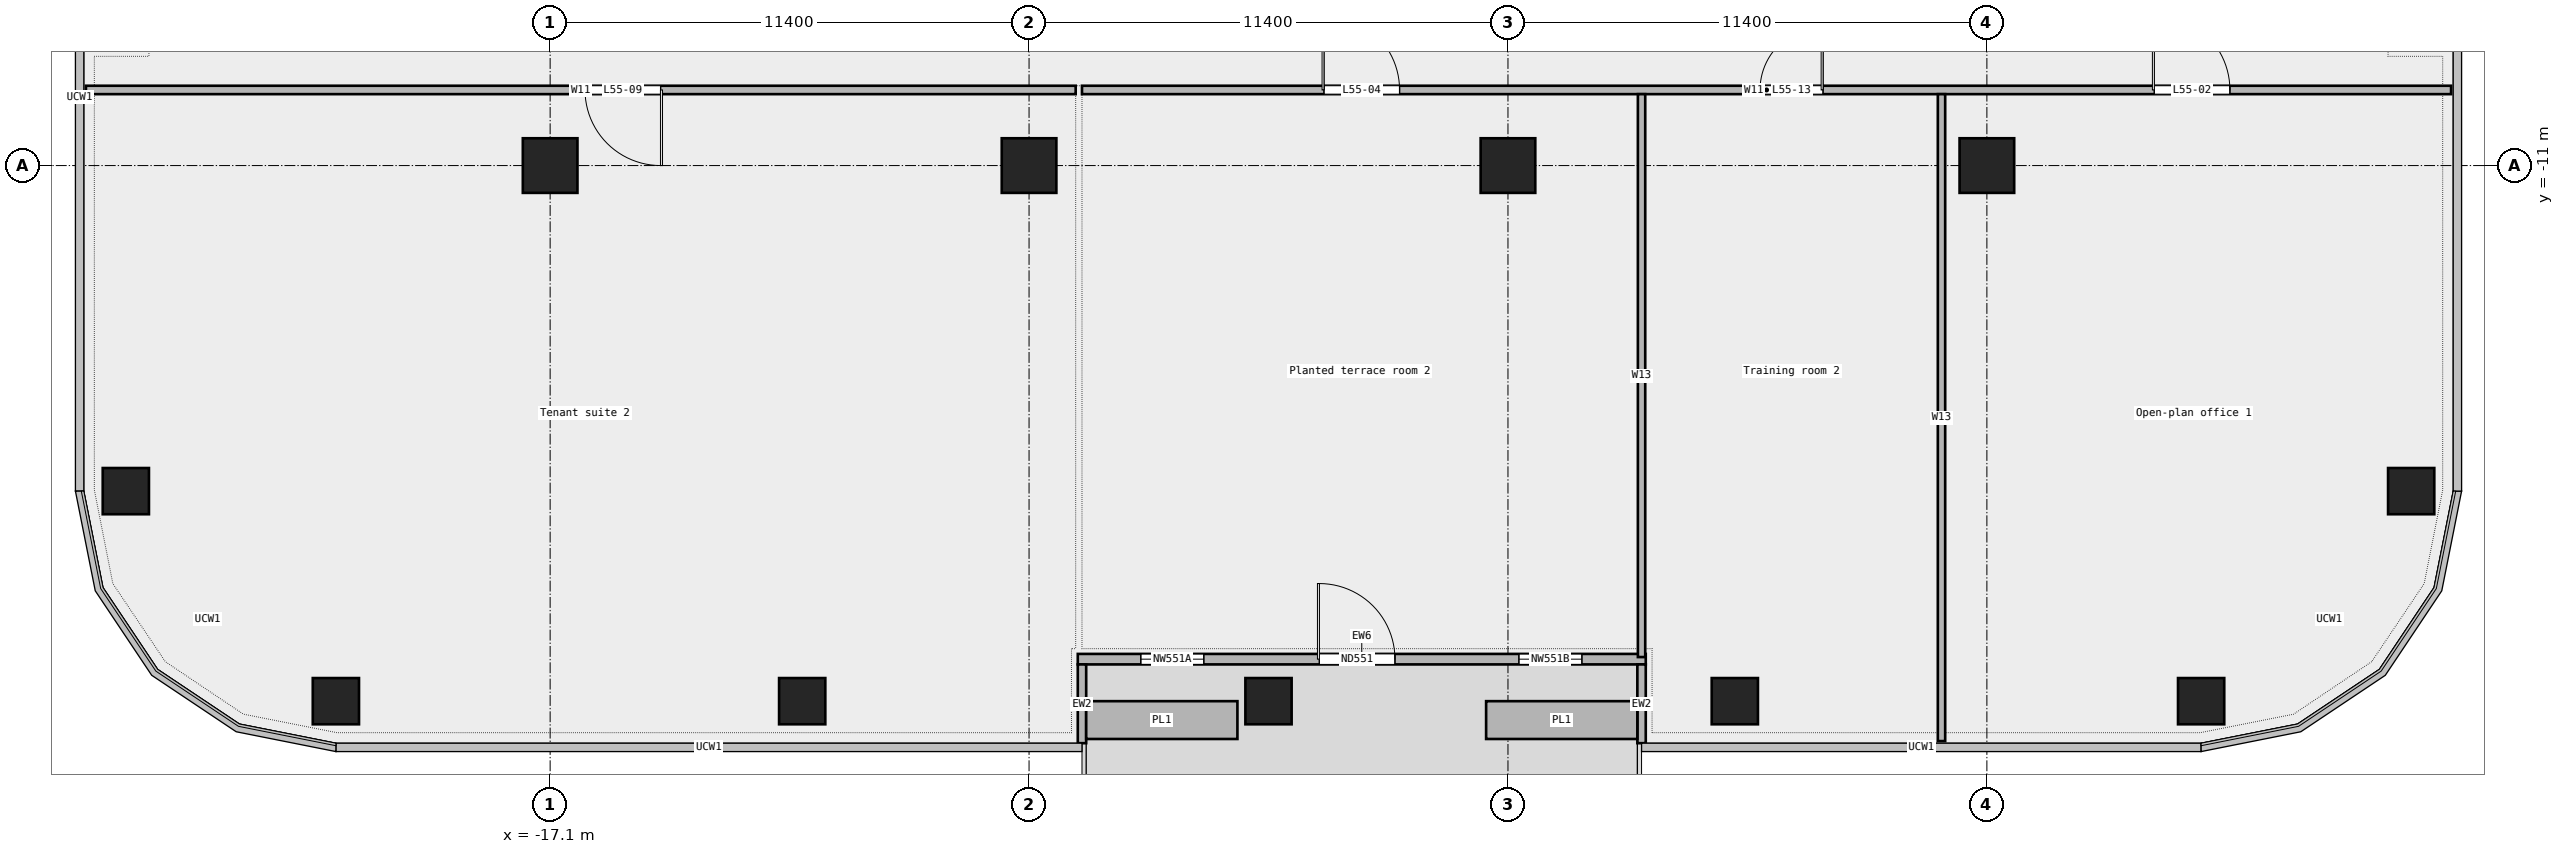
"""IFC4 building model, lengths in metres.
Left out: names, types, materials, properties, quantities, classifications, styles, units other than length and angle.
Written with IfcOpenShell. Run it as: python <this file> out.ifc"""

import sys

from ifc_helpers import new_model, si_unit, direction, frame, frame_2d, origin, origin_2d, place, context, subcontext, project, spatial, rectangle, extrude, element, fill, save


model = new_model("IFC4")
c1 = context("Model", 3, precision=1e-05, world=origin(), true_north=direction((0.0, 1.0)))
c2 = subcontext(c1, "Body", "Model", "MODEL_VIEW")
j1 = project(units=[si_unit("LENGTHUNIT", "METRE"), si_unit("PLANEANGLEUNIT", "RADIAN")], contexts=[c1])
p1 = place(None, origin())
s1 = spatial("IfcSite", under=j1, at=p1, CompositionType="ELEMENT")
p2 = place(p1, origin())
s2 = spatial("IfcBuilding", under=s1, at=p2, CompositionType="ELEMENT")
p3 = place(p2, frame((0.0, 0.0, 255.0)))
s3 = spatial("IfcBuildingStorey", under=s2, at=p3, CompositionType="ELEMENT", Elevation=255.0)
for number, where, z_axis, x_axis in (
    (1, (-22.2, -23.75, 0.0), (0.0, 0.0, 1.0), (1.0, 0.0, 0.0)),
    (2, (-11.1, -23.75, 0.0), (0.0, 0.0, 1.0), (1.0, 0.0, 0.0)),
    (3, (0.0, -23.75, 0.0), (0.0, 0.0, 1.0), (1.0, 0.0, 0.0)),
    (4, (11.1, -23.75, 0.0), (0.0, 0.0, 1.0), (1.0, 0.0, 0.0)),
    (5, (22.2, -23.75, 0.0), (0.0, 0.0, 1.0), (1.0, 0.0, 0.0)),
    (6, (27.2, -18.75, 0.0), (0.0, 0.0, 1.0), (1.0, 0.0, 0.0)),
    (7, (-27.2, -18.75, 0.0), (0.0, 0.0, 1.0), (1.0, 0.0, 0.0)),
):
    element("IfcColumn", number, at=place(p3, frame(where, z_axis=z_axis, x_axis=x_axis)), inside=s3, PredefinedType="COLUMN", context=c2, shape_type="SweptSolid", body=[
        extrude(rectangle(XDim=1.1, YDim=1.1, at=origin_2d()), origin(), (0.0, 0.0, 1.0), 3.4),
    ])
for number, where, z_axis, x_axis in (
    (8, (-17.1, -11.0, 0.0), (0.0, 0.0, 1.0), (1.0, 0.0, 0.0)),
    (9, (-5.7, -11.0, 0.0), (0.0, 0.0, 1.0), (1.0, 0.0, 0.0)),
    (10, (5.7, -11.0, 0.0), (0.0, 0.0, 1.0), (1.0, 0.0, 0.0)),
    (11, (17.1, -11.0, 0.0), (0.0, 0.0, 1.0), (1.0, 0.0, 0.0)),
):
    element("IfcColumn", number, at=place(p3, frame(where, z_axis=z_axis, x_axis=x_axis)), inside=s3, PredefinedType="COLUMN", context=c2, shape_type="SweptSolid", body=[
        extrude(rectangle(XDim=1.3, YDim=1.3, at=origin_2d()), origin(), (0.0, 0.0, 1.0), 3.4),
    ])
p4 = place(p3, frame((-4.54, -22.75, 0.0), z_axis=(0.0, 0.0, 1.0), x_axis=(1.0, 0.0, 0.0)))
e12 = element("IfcWall", 12, at=p4, inside=s3, PredefinedType="STANDARD", context=c2, shape_type="SweptSolid", body=[
    extrude(rectangle(XDim=13.52, YDim=0.25, at=frame_2d((6.76, 0.0))), origin(), (0.0, 0.0, 1.0), 3.4),
])
p5 = place(p4, frame((1.5, 0.0, 0.45)))
e13 = element("IfcOpeningElement", 13, at=p5, cuts=e12, PredefinedType="OPENING", context=c2, shape_type="SweptSolid", body=[
    extrude(rectangle(XDim=1.5, YDim=2.4, at=frame_2d((0.75, 1.2))), frame((0.0, 0.137, 0.0), z_axis=(0.0, -1.0, 0.0), x_axis=(1.0, 0.0, 0.0)), (0.0, 0.0, 1.0), 0.274),
])
p6 = place(p4, frame((5.75, 0.0, 0.0)))
e14 = element("IfcOpeningElement", 14, at=p6, cuts=e12, PredefinedType="OPENING", context=c2, shape_type="SweptSolid", body=[
    extrude(rectangle(XDim=1.8, YDim=2.4, at=frame_2d((0.9, 1.2))), frame((0.0, 0.137, 0.0), z_axis=(0.0, -1.0, 0.0), x_axis=(1.0, 0.0, 0.0)), (0.0, 0.0, 1.0), 0.274),
])
p7 = place(p4, frame((10.5, 0.0, 0.45)))
e15 = element("IfcOpeningElement", 15, at=p7, cuts=e12, PredefinedType="OPENING", context=c2, shape_type="SweptSolid", body=[
    extrude(rectangle(XDim=1.5, YDim=2.4, at=frame_2d((0.75, 1.2))), frame((0.0, 0.137, 0.0), z_axis=(0.0, -1.0, 0.0), x_axis=(1.0, 0.0, 0.0)), (0.0, 0.0, 1.0), 0.274),
])
for number, where, z_axis, x_axis in (
    (16, (-4.44, -24.75, 0.0), (0.0, 0.0, 1.0), (0.0, 1.0, 0.0)),
    (17, (8.88, -24.75, 0.0), (0.0, 0.0, 1.0), (0.0, 1.0, 0.0)),
):
    element("IfcWall", number, at=place(p3, frame(where, z_axis=z_axis, x_axis=x_axis)), inside=s3, PredefinedType="STANDARD", context=c2, shape_type="SweptSolid", body=[
        extrude(rectangle(XDim=1.875, YDim=0.2, at=frame_2d((0.938, 0.0))), origin(), (0.0, 0.0, 1.0), 3.4),
    ])
for number, where, z_axis, x_axis in (
    (18, (-4.34, -24.2, 0.0), (0.0, 0.0, 1.0), (1.0, 0.0, 0.0)),
    (19, (5.18, -24.2, 0.0), (0.0, 0.0, 1.0), (1.0, 0.0, 0.0)),
):
    element("IfcWall", number, at=place(p3, frame(where, z_axis=z_axis, x_axis=x_axis)), inside=s3, PredefinedType="STANDARD", context=c2, shape_type="SweptSolid", body=[
        extrude(rectangle(XDim=3.6, YDim=0.9, at=frame_2d((1.8, 0.0))), origin(), (0.0, 0.0, 1.0), 0.7),
    ])
p8 = place(p3, frame((-28.15, -9.2, 0.0), z_axis=(0.0, 0.0, 1.0), x_axis=(1.0, 0.0, 0.0)))
e20 = element("IfcWall", 20, at=p8, inside=s3, PredefinedType="PARTITIONING", context=c2, shape_type="SweptSolid", body=[
    extrude(rectangle(XDim=23.56, YDim=0.2, at=frame_2d((11.78, 0.0))), origin(), (0.0, 0.0, 1.0), 3.4),
])
p9 = place(p8, frame((11.88, 0.0, 0.0)))
e21 = element("IfcOpeningElement", 21, at=p9, cuts=e20, PredefinedType="OPENING", context=c2, shape_type="SweptSolid", body=[
    extrude(rectangle(XDim=1.8, YDim=2.1, at=frame_2d((0.9, 1.05))), frame((0.0, 0.112, 0.0), z_axis=(0.0, -1.0, 0.0), x_axis=(1.0, 0.0, 0.0)), (0.0, 0.0, 1.0), 0.224),
])
p10 = place(p3, frame((-4.44, -9.2, 0.0), z_axis=(0.0, 0.0, 1.0), x_axis=(1.0, 0.0, 0.0)))
e22 = element("IfcWall", 22, at=p10, inside=s3, PredefinedType="PARTITIONING", context=c2, shape_type="SweptSolid", body=[
    extrude(rectangle(XDim=32.59, YDim=0.2, at=frame_2d((16.295, 0.0))), origin(), (0.0, 0.0, 1.0), 3.4),
])
p11 = place(p10, frame((25.525, 0.0, 0.0)))
e23 = element("IfcOpeningElement", 23, at=p11, cuts=e22, PredefinedType="OPENING", context=c2, shape_type="SweptSolid", body=[
    extrude(rectangle(XDim=1.8, YDim=2.1, at=frame_2d((0.9, 1.05))), frame((0.0, 0.112, 0.0), z_axis=(0.0, -1.0, 0.0), x_axis=(1.0, 0.0, 0.0)), (0.0, 0.0, 1.0), 0.224),
])
p12 = place(p10, frame((5.76, 0.0, 0.0)))
e24 = element("IfcOpeningElement", 24, at=p12, cuts=e22, PredefinedType="OPENING", context=c2, shape_type="SweptSolid", body=[
    extrude(rectangle(XDim=1.8, YDim=2.1, at=frame_2d((0.9, 1.05))), frame((0.0, 0.112, 0.0), z_axis=(0.0, -1.0, 0.0), x_axis=(1.0, 0.0, 0.0)), (0.0, 0.0, 1.0), 0.224),
])
p13 = place(p10, frame((16.14, 0.0, 0.0)))
e25 = element("IfcOpeningElement", 25, at=p13, cuts=e22, PredefinedType="OPENING", context=c2, shape_type="SweptSolid", body=[
    extrude(rectangle(XDim=1.5, YDim=2.1, at=frame_2d((0.75, 1.05))), frame((0.0, 0.112, 0.0), z_axis=(0.0, -1.0, 0.0), x_axis=(1.0, 0.0, 0.0)), (0.0, 0.0, 1.0), 0.224),
])
p14 = place(p3, frame((8.88, -22.7, 0.0), z_axis=(0.0, 0.0, 1.0), x_axis=(0.0, 1.0, 0.0)))
e26 = element("IfcWall", 26, at=p14, inside=s3, PredefinedType="PARTITIONING", context=c2, shape_type="SweptSolid", body=[
    extrude(rectangle(XDim=13.4, YDim=0.175, at=frame_2d((6.7, 0.0))), origin(), (0.0, 0.0, 1.0), 3.4),
])
p15 = place(p3, frame((16.02, -24.7, 0.0), z_axis=(0.0, 0.0, 1.0), x_axis=(0.0, 1.0, 0.0)))
e27 = element("IfcWall", 27, at=p15, inside=s3, PredefinedType="PARTITIONING", context=c2, shape_type="SweptSolid", body=[
    extrude(rectangle(XDim=15.4, YDim=0.175, at=frame_2d((7.7, 0.0))), origin(), (0.0, 0.0, 1.0), 3.4),
])
p16 = place(p5, origin())
e28 = element("IfcWindow", 28, at=p16, inside=s3, PartitioningType="SINGLE_PANEL", PredefinedType="WINDOW", context=c2, shape_type="SweptSolid", body=[
    extrude(rectangle(XDim=1.5, YDim=2.4, at=frame_2d((0.75, 1.2))), frame((0.0, 0.03, 0.0), z_axis=(0.0, -1.0, 0.0), x_axis=(1.0, 0.0, 0.0)), (0.0, 0.0, 1.0), 0.06),
])
fill(e13, e28)
p17 = place(p6, origin())
e29 = element("IfcDoor", 29, at=p17, inside=s3, OperationType="DOUBLE_DOOR_SINGLE_SWING", PredefinedType="DOOR", context=c2, shape_type="SweptSolid", body=[
    extrude(rectangle(XDim=1.8, YDim=2.4, at=frame_2d((0.9, 1.2))), frame((0.0, 0.025, 0.0), z_axis=(0.0, -1.0, 0.0), x_axis=(1.0, 0.0, 0.0)), (0.0, 0.0, 1.0), 0.05),
])
fill(e14, e29)
p18 = place(p7, origin())
e30 = element("IfcWindow", 30, at=p18, inside=s3, PartitioningType="SINGLE_PANEL", PredefinedType="WINDOW", context=c2, shape_type="SweptSolid", body=[
    extrude(rectangle(XDim=1.5, YDim=2.4, at=frame_2d((0.75, 1.2))), frame((0.0, 0.03, 0.0), z_axis=(0.0, -1.0, 0.0), x_axis=(1.0, 0.0, 0.0)), (0.0, 0.0, 1.0), 0.06),
])
fill(e15, e30)
p19 = place(p11, origin())
e31 = element("IfcDoor", 31, at=p19, inside=s3, OperationType="DOUBLE_DOOR_SINGLE_SWING", PredefinedType="DOOR", context=c2, shape_type="SweptSolid", body=[
    extrude(rectangle(XDim=1.8, YDim=2.1, at=frame_2d((0.9, 1.05))), frame((0.0, 0.025, 0.0), z_axis=(0.0, -1.0, 0.0), x_axis=(1.0, 0.0, 0.0)), (0.0, 0.0, 1.0), 0.05),
])
fill(e23, e31)
p20 = place(p12, origin())
e32 = element("IfcDoor", 32, at=p20, inside=s3, OperationType="DOUBLE_DOOR_SINGLE_SWING", PredefinedType="DOOR", context=c2, shape_type="SweptSolid", body=[
    extrude(rectangle(XDim=1.8, YDim=2.1, at=frame_2d((0.9, 1.05))), frame((0.0, 0.025, 0.0), z_axis=(0.0, -1.0, 0.0), x_axis=(1.0, 0.0, 0.0)), (0.0, 0.0, 1.0), 0.05),
])
fill(e24, e32)
p21 = place(p9, origin())
e33 = element("IfcDoor", 33, at=p21, inside=s3, OperationType="DOUBLE_DOOR_SINGLE_SWING", PredefinedType="DOOR", context=c2, shape_type="SweptSolid", body=[
    extrude(rectangle(XDim=1.8, YDim=2.1, at=frame_2d((0.9, 1.05))), frame((0.0, 0.025, 0.0), z_axis=(0.0, -1.0, 0.0), x_axis=(1.0, 0.0, 0.0)), (0.0, 0.0, 1.0), 0.05),
])
fill(e21, e33)
p22 = place(p13, origin())
e34 = element("IfcDoor", 34, at=p22, inside=s3, OperationType="DOUBLE_DOOR_SINGLE_SWING", PredefinedType="DOOR", context=c2, shape_type="SweptSolid", body=[
    extrude(rectangle(XDim=1.5, YDim=2.1, at=frame_2d((0.75, 1.05))), frame((0.0, 0.025, 0.0), z_axis=(0.0, -1.0, 0.0), x_axis=(1.0, 0.0, 0.0)), (0.0, 0.0, 1.0), 0.05),
])
fill(e25, e34)
save(model, sys.argv[1])
